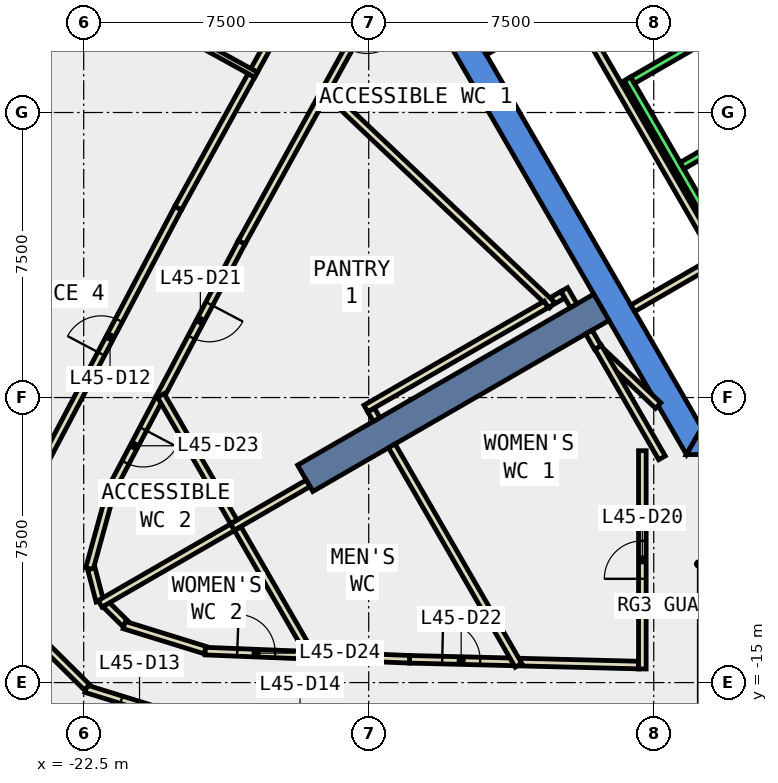
"""IFC4 building model, lengths in metres.
Left out: names, types, materials, properties, quantities, classifications, styles, units other than length and angle.
Written with IfcOpenShell. Run it as: python <this file> out.ifc"""

import sys

from ifc_helpers import new_model, si_unit, direction, frame, frame_2d, origin, place, context, subcontext, project, spatial, polyline, rectangle, outline, extrude, element, fill, save


model = new_model("IFC4")
c1 = context("Model", 3, precision=1e-05, world=origin(), true_north=direction((0.0, 1.0)))
c2 = subcontext(c1, "Body", "Model", "MODEL_VIEW")
j1 = project(units=[si_unit("LENGTHUNIT", "METRE"), si_unit("PLANEANGLEUNIT", "RADIAN")], contexts=[c1])
p1 = place(None, origin())
s1 = spatial("IfcSite", under=j1, at=p1, CompositionType="ELEMENT")
p2 = place(p1, origin())
s2 = spatial("IfcBuilding", under=s1, at=p2, CompositionType="ELEMENT")
p3 = place(p2, frame((0.0, 0.0, 202.4)))
s3 = spatial("IfcBuildingStorey", under=s2, at=p3, CompositionType="ELEMENT", Elevation=202.4)
p4 = place(p3, frame((0.0, 0.0, -0.4)))
e1 = element("IfcWall", 1, at=p4, inside=s3, PredefinedType="SHEAR", context=c2, shape_type="SweptSolid", body=[
    extrude(outline(polyline([(-13.279, 2.5), (-6.64, -9.0), (-6.235, -8.3), (-12.471, 2.5), (-13.279, 2.5)])), origin(), (0.0, 0.0, 1.0), 4.2),
])
p5 = place(p3, frame((0.0, 0.0, -0.4)))
e2 = element("IfcWall", 2, at=p5, inside=s3, PredefinedType="SHEAR", context=c2, shape_type="SweptSolid", body=[
    extrude(outline(polyline([(3.75, -9.0), (3.75, -8.3), (-6.235, -8.3), (-6.64, -9.0), (3.75, -9.0)])), origin(), (0.0, 0.0, 1.0), 4.2),
])
p6 = place(p3, frame((-8.877, -5.125, -0.4), z_axis=(0.0, 0.0, 1.0), x_axis=(-0.866017533419, -0.500013631625, 0.0)))
e3 = element("IfcWall", 3, at=p6, inside=s3, PredefinedType="SHEAR", context=c2, shape_type="SweptSolid", body=[
    extrude(rectangle(XDim=9.0, YDim=0.8, at=frame_2d((4.5, 0.0))), origin(), (0.0, 0.0, 1.0), 4.2),
])
p7 = place(p3, frame((-21.51, 7.086, 0.0), z_axis=(0.0, 0.0, 1.0), x_axis=(-0.483590905878, -0.875294142419, 0.0)))
e4 = element("IfcWall", 4, at=p7, inside=s3, PredefinedType="STANDARD", context=c2, shape_type="SweptSolid", body=[
    extrude(rectangle(XDim=7.238, YDim=0.3, at=frame_2d((3.619, 0.0))), origin(), (0.0, 0.0, 1.0), 3.8),
])
p8 = place(p7, frame((0.609, 0.0, 0.9)))
e5 = element("IfcOpeningElement", 5, at=p8, cuts=e4, PredefinedType="OPENING", context=c2, shape_type="SweptSolid", body=[
    extrude(rectangle(XDim=2.4, YDim=2.6, at=frame_2d((1.2, 1.3))), frame((0.0, 0.16, 0.0), z_axis=(0.0, -1.0, 0.0), x_axis=(1.0, 0.0, 0.0)), (0.0, 0.0, 1.0), 0.32),
])
p9 = place(p7, frame((4.228, 0.0, 0.9)))
e6 = element("IfcOpeningElement", 6, at=p9, cuts=e4, PredefinedType="OPENING", context=c2, shape_type="SweptSolid", body=[
    extrude(rectangle(XDim=2.4, YDim=2.6, at=frame_2d((1.2, 1.3))), frame((0.0, 0.16, 0.0), z_axis=(0.0, -1.0, 0.0), x_axis=(1.0, 0.0, 0.0)), (0.0, 0.0, 1.0), 0.32),
])
p10 = place(p3, frame((-14.487, 3.564, 0.0), z_axis=(0.0, 0.0, 1.0), x_axis=(-0.483555199903, -0.875313868648, 0.0)))
e7 = element("IfcWall", 7, at=p10, inside=s3, PredefinedType="PARTITIONING", context=c2, shape_type="SweptSolid", body=[
    extrude(rectangle(XDim=3.309, YDim=0.2, at=frame_2d((1.654, 0.0))), origin(), (0.0, 0.0, 1.0), 3.8),
])
p11 = place(p10, frame((1.154, 0.0, 0.0)))
e8 = element("IfcOpeningElement", 8, at=p11, cuts=e7, PredefinedType="OPENING", context=c2, shape_type="SweptSolid", body=[
    extrude(rectangle(XDim=1.0, YDim=2.1, at=frame_2d((0.5, 1.05))), frame((0.0, 0.11, 0.0), z_axis=(0.0, -1.0, 0.0), x_axis=(1.0, 0.0, 0.0)), (0.0, 0.0, 1.0), 0.22),
])
p12 = place(p3, frame((-11.009, -14.461, 0.0), z_axis=(0.0, 0.0, 1.0), x_axis=(0.999684451251, -0.025119672116, 0.0)))
e9 = element("IfcWall", 9, at=p12, inside=s3, PredefinedType="PARTITIONING", context=c2, shape_type="SweptSolid", body=[
    extrude(rectangle(XDim=3.11, YDim=0.2, at=frame_2d((1.555, 0.0))), origin(), (0.0, 0.0, 1.0), 3.8),
])
p13 = place(p3, frame((-16.184, 0.493, 0.0), z_axis=(0.0, 0.0, 1.0), x_axis=(-0.48354397003, -0.875320072344, 0.0)))
e10 = element("IfcWall", 10, at=p13, inside=s3, PredefinedType="PARTITIONING", context=c2, shape_type="SweptSolid", body=[
    extrude(rectangle(XDim=4.467, YDim=0.2, at=frame_2d((2.233, 0.0))), origin(), (0.0, 0.0, 1.0), 3.8),
])
p14 = place(p3, frame((-18.344, -3.417, 0.0), z_axis=(0.0, 0.0, 1.0), x_axis=(-0.466889669343, -0.884315575267, 0.0)))
e11 = element("IfcWall", 11, at=p14, inside=s3, PredefinedType="PARTITIONING", context=c2, shape_type="SweptSolid", body=[
    extrude(rectangle(XDim=4.654, YDim=0.2, at=frame_2d((2.327, 0.0))), origin(), (0.0, 0.0, 1.0), 3.8),
])
p15 = place(p14, frame((1.827, 0.0, 0.0)))
e12 = element("IfcOpeningElement", 12, at=p15, cuts=e11, PredefinedType="OPENING", context=c2, shape_type="SweptSolid", body=[
    extrude(rectangle(XDim=1.0, YDim=2.1, at=frame_2d((0.5, 1.05))), frame((0.0, 0.11, 0.0), z_axis=(0.0, -1.0, 0.0), x_axis=(1.0, 0.0, 0.0)), (0.0, 0.0, 1.0), 0.22),
])
p16 = place(p3, frame((-16.422, -14.287, 0.0), z_axis=(0.0, 0.0, 1.0), x_axis=(0.999201426829, -0.039956333943, 0.0)))
e13 = element("IfcWall", 13, at=p16, inside=s3, PredefinedType="PARTITIONING", context=c2, shape_type="SweptSolid", body=[
    extrude(rectangle(XDim=2.499, YDim=0.2, at=frame_2d((1.25, 0.0))), origin(), (0.0, 0.0, 1.0), 3.8),
])
p17 = place(p3, frame((-13.925, -14.387, 0.0), z_axis=(0.0, 0.0, 1.0), x_axis=(0.999685678874, -0.025070768935, 0.0)))
e14 = element("IfcWall", 14, at=p17, inside=s3, PredefinedType="PARTITIONING", context=c2, shape_type="SweptSolid", body=[
    extrude(rectangle(XDim=2.717, YDim=0.2, at=frame_2d((1.358, 0.0))), origin(), (0.0, 0.0, 1.0), 3.8),
])
p18 = place(p17, frame((0.858, 0.0, 0.0)))
e15 = element("IfcOpeningElement", 15, at=p18, cuts=e14, PredefinedType="OPENING", context=c2, shape_type="SweptSolid", body=[
    extrude(rectangle(XDim=1.0, YDim=2.1, at=frame_2d((0.5, 1.05))), frame((0.0, 0.11, 0.0), z_axis=(0.0, -1.0, 0.0), x_axis=(1.0, 0.0, 0.0)), (0.0, 0.0, 1.0), 0.22),
])
p19 = place(p3, frame((-20.517, -7.533, 0.0), z_axis=(0.0, 0.0, 1.0), x_axis=(-0.466570716246, -0.88448389852, 0.0)))
e16 = element("IfcWall", 16, at=p19, inside=s3, PredefinedType="PARTITIONING", context=c2, shape_type="SweptSolid", body=[
    extrude(rectangle(XDim=2.795, YDim=0.2, at=frame_2d((1.397, 0.0))), origin(), (0.0, 0.0, 1.0), 3.8),
])
p20 = place(p19, frame((0.897, 0.0, 0.0)))
e17 = element("IfcOpeningElement", 17, at=p20, cuts=e16, PredefinedType="OPENING", context=c2, shape_type="SweptSolid", body=[
    extrude(rectangle(XDim=1.0, YDim=2.1, at=frame_2d((0.5, 1.05))), frame((0.0, 0.11, 0.0), z_axis=(0.0, -1.0, 0.0), x_axis=(1.0, 0.0, 0.0)), (0.0, 0.0, 1.0), 0.22),
])
p21 = place(p3, frame((-21.801, -10.013, 0.0), z_axis=(0.0, 0.0, 1.0), x_axis=(-0.265584627827, -0.964087550725, 0.0)))
e18 = element("IfcWall", 18, at=p21, inside=s3, PredefinedType="PARTITIONING", context=c2, shape_type="SweptSolid", body=[
    extrude(rectangle(XDim=2.067, YDim=0.2, at=frame_2d((1.034, 0.0))), origin(), (0.0, 0.0, 1.0), 3.8),
])
p22 = place(p3, frame((-22.298, -12.006, 0.0), z_axis=(0.0, 0.0, 1.0), x_axis=(0.252647929446, -0.967558279251, 0.0)))
e19 = element("IfcWall", 19, at=p22, inside=s3, PredefinedType="PARTITIONING", context=c2, shape_type="SweptSolid", body=[
    extrude(rectangle(XDim=0.879, YDim=0.2, at=frame_2d((0.44, 0.0))), origin(), (0.0, 0.0, 1.0), 3.8),
])
p23 = place(p3, frame((-21.912, -12.948, 0.0), z_axis=(0.0, 0.0, 1.0), x_axis=(0.712089244685, -0.702088959893, 0.0)))
e20 = element("IfcWall", 20, at=p23, inside=s3, PredefinedType="PARTITIONING", context=c2, shape_type="SweptSolid", body=[
    extrude(rectangle(XDim=0.708, YDim=0.2, at=frame_2d((0.354, 0.0))), origin(), (0.0, 0.0, 1.0), 3.8),
])
p24 = place(p3, frame((-21.433, -13.486, 0.0), z_axis=(0.0, 0.0, 1.0), x_axis=(0.955241047187, -0.295828568211, 0.0)))
e21 = element("IfcWall", 21, at=p24, inside=s3, PredefinedType="PARTITIONING", context=c2, shape_type="SweptSolid", body=[
    extrude(rectangle(XDim=2.234, YDim=0.2, at=frame_2d((1.117, 0.0))), origin(), (0.0, 0.0, 1.0), 3.8),
])
p25 = place(p3, frame((-19.303, -14.172, 0.0), z_axis=(0.0, 0.0, 1.0), x_axis=(0.999205458466, -0.03985538574, 0.0)))
e22 = element("IfcWall", 22, at=p25, inside=s3, PredefinedType="PARTITIONING", context=c2, shape_type="SweptSolid", body=[
    extrude(rectangle(XDim=2.683, YDim=0.2, at=frame_2d((1.342, 0.0))), origin(), (0.0, 0.0, 1.0), 3.8),
])
p26 = place(p25, frame((0.842, 0.0, 0.0)))
e23 = element("IfcOpeningElement", 23, at=p26, cuts=e22, PredefinedType="OPENING", context=c2, shape_type="SweptSolid", body=[
    extrude(rectangle(XDim=1.0, YDim=2.1, at=frame_2d((0.5, 1.05))), frame((0.0, 0.11, 0.0), z_axis=(0.0, -1.0, 0.0), x_axis=(1.0, 0.0, 0.0)), (0.0, 0.0, 1.0), 0.22),
])
p27 = place(p3, frame((-18.015, 1.107, 0.0), z_axis=(0.0, 0.0, 1.0), x_axis=(0.483551557311, 0.875315880938, 0.0)))
e24 = element("IfcWall", 24, at=p27, inside=s3, PredefinedType="PARTITIONING", context=c2, shape_type="SweptSolid", body=[
    extrude(rectangle(XDim=3.987, YDim=0.2, at=frame_2d((1.994, 0.0))), origin(), (0.0, 0.0, 1.0), 3.8),
])
p28 = place(p3, frame((-23.598, -9.301, 0.0), z_axis=(0.0, 0.0, 1.0), x_axis=(0.466852608943, 0.884335140952, 0.0)))
e25 = element("IfcWall", 25, at=p28, inside=s3, PredefinedType="PARTITIONING", context=c2, shape_type="SweptSolid", body=[
    extrude(rectangle(XDim=7.675, YDim=0.2, at=frame_2d((3.837, 0.0))), origin(), (0.0, 0.0, 1.0), 3.8),
])
p29 = place(p28, frame((3.337, 0.0, 0.0)))
e26 = element("IfcOpeningElement", 26, at=p29, cuts=e25, PredefinedType="OPENING", context=c2, shape_type="SweptSolid", body=[
    extrude(rectangle(XDim=1.0, YDim=2.1, at=frame_2d((0.5, 1.05))), frame((0.0, 0.11, 0.0), z_axis=(0.0, -1.0, 0.0), x_axis=(1.0, 0.0, 0.0)), (0.0, 0.0, 1.0), 0.22),
])
p30 = place(p3, frame((-20.015, -2.514, 0.0), z_axis=(0.0, 0.0, 1.0), x_axis=(0.483363864601, 0.875419541933, 0.0)))
e27 = element("IfcWall", 27, at=p30, inside=s3, PredefinedType="PARTITIONING", context=c2, shape_type="SweptSolid", body=[
    extrude(rectangle(XDim=3.987, YDim=0.2, at=frame_2d((1.993, 0.0))), origin(), (0.0, 0.0, 1.0), 3.8),
])
p31 = place(p3, frame((-19.623, -16.035, 0.0), z_axis=(0.0, 0.0, 1.0), x_axis=(-0.955234616163, 0.295849333419, 0.0)))
e28 = element("IfcWall", 28, at=p31, inside=s3, PredefinedType="PARTITIONING", context=c2, shape_type="SweptSolid", body=[
    extrude(rectangle(XDim=2.947, YDim=0.2, at=frame_2d((1.473, 0.0))), origin(), (0.0, 0.0, 1.0), 3.8),
])
p32 = place(p31, frame((0.974, 0.0, 0.0)))
e29 = element("IfcOpeningElement", 29, at=p32, cuts=e28, PredefinedType="OPENING", context=c2, shape_type="SweptSolid", body=[
    extrude(rectangle(XDim=1.0, YDim=2.1, at=frame_2d((0.5, 1.05))), frame((0.0, 0.11, 0.0), z_axis=(0.0, -1.0, 0.0), x_axis=(1.0, 0.0, 0.0)), (0.0, 0.0, 1.0), 0.22),
])
p33 = place(p3, frame((-22.414, -15.123, 0.0), z_axis=(0.0, 0.0, 1.0), x_axis=(-0.710949827962, 0.703242733429, 0.0)))
e30 = element("IfcWall", 30, at=p33, inside=s3, PredefinedType="PARTITIONING", context=c2, shape_type="SweptSolid", body=[
    extrude(rectangle(XDim=2.059, YDim=0.2, at=frame_2d((1.03, 0.0))), origin(), (0.0, 0.0, 1.0), 3.8),
])
p34 = place(p3, frame((-5.888, -3.902, 0.0), z_axis=(0.0, 0.0, 1.0), x_axis=(-0.866022959057, -0.500004234368, 0.0)))
e31 = element("IfcWall", 31, at=p34, inside=s3, PredefinedType="PARTITIONING", context=c2, shape_type="SweptSolid", body=[
    extrude(rectangle(XDim=2.5, YDim=0.2, at=frame_2d((1.25, 0.0))), origin(), (0.0, 0.0, 1.0), 3.8),
])
p35 = place(p3, frame((-11.953, 1.603, 0.0), z_axis=(0.0, 0.0, 1.0), x_axis=(0.865998541277, 0.500046524342, 0.0)))
e32 = element("IfcWall", 32, at=p35, inside=s3, PredefinedType="PARTITIONING", context=c2, shape_type="SweptSolid", body=[
    extrude(rectangle(XDim=2.5, YDim=0.2, at=frame_2d((1.25, 0.0))), origin(), (0.0, 0.0, 1.0), 3.8),
])
p36 = place(p35, frame((1.5, 0.0, 0.0)))
e33 = element("IfcOpeningElement", 33, at=p36, cuts=e32, PredefinedType="OPENING", context=c2, shape_type="SweptSolid", body=[
    extrude(rectangle(XDim=0.9, YDim=2.1, at=frame_2d((0.45, 1.05))), frame((0.0, 0.11, 0.0), z_axis=(0.0, -1.0, 0.0), x_axis=(1.0, 0.0, 0.0)), (0.0, 0.0, 1.0), 0.22),
])
p37 = place(p3, frame((-9.751, 2.99, 0.0), z_axis=(0.0, 0.0, 1.0), x_axis=(0.500012163284, -0.866018381195, 0.0)))
e34 = element("IfcWall", 34, at=p37, inside=s3, PredefinedType="PARTITIONING", context=c2, shape_type="SweptSolid", body=[
    extrude(rectangle(XDim=8.0, YDim=0.2, at=frame_2d((4.0, 0.0))), origin(), (0.0, 0.0, 1.0), 3.8),
])
p38 = place(p3, frame((-8.84, -6.332, 0.0), z_axis=(0.0, 0.0, 1.0), x_axis=(0.726080635734, -0.687609562479, 0.0)))
e35 = element("IfcWall", 35, at=p38, inside=s3, PredefinedType="PARTITIONING", context=c2, shape_type="SweptSolid", body=[
    extrude(rectangle(XDim=2.005, YDim=0.2, at=frame_2d((1.003, 0.0))), origin(), (0.0, 0.0, 1.0), 3.8),
])
p39 = place(p3, frame((-7.8, -14.641, 0.0), z_axis=(0.0, 0.0, 1.0), x_axis=(0.0, 1.0, 0.0)))
e36 = element("IfcWall", 36, at=p39, inside=s3, PredefinedType="PARTITIONING", context=c2, shape_type="SweptSolid", body=[
    extrude(rectangle(XDim=5.742, YDim=0.2, at=frame_2d((2.871, 0.0))), origin(), (0.0, 0.0, 1.0), 3.8),
])
p40 = place(p39, frame((2.371, 0.0, 0.0)))
e37 = element("IfcOpeningElement", 37, at=p40, cuts=e36, PredefinedType="OPENING", context=c2, shape_type="SweptSolid", body=[
    extrude(rectangle(XDim=1.0, YDim=2.1, at=frame_2d((0.5, 1.05))), frame((0.0, 0.11, 0.0), z_axis=(0.0, -1.0, 0.0), x_axis=(1.0, 0.0, 0.0)), (0.0, 0.0, 1.0), 0.22),
])
p41 = place(p3, frame((-7.283, -9.086, 0.0), z_axis=(0.0, 0.0, 1.0), x_axis=(-0.499883958536, 0.86609238999, 0.0)))
e38 = element("IfcWall", 38, at=p41, inside=s3, PredefinedType="PARTITIONING", context=c2, shape_type="SweptSolid", body=[
    extrude(rectangle(XDim=3.359, YDim=0.2, at=frame_2d((1.679, 0.0))), origin(), (0.0, 0.0, 1.0), 3.8),
])
p42 = place(p3, frame((-8.973, -6.183, 0.0), z_axis=(0.0, 0.0, 1.0), x_axis=(-0.499557093027, 0.86628096528, 0.0)))
e39 = element("IfcWall", 39, at=p42, inside=s3, PredefinedType="PARTITIONING", context=c2, shape_type="SweptSolid", body=[
    extrude(rectangle(XDim=0.469, YDim=0.2, at=frame_2d((0.234, 0.0))), origin(), (0.0, 0.0, 1.0), 3.8),
])
p43 = place(p3, frame((-9.89, -4.795, 0.0), z_axis=(0.0, 0.0, 1.0), x_axis=(-0.866447259568, -0.499268611457, 0.0)))
e40 = element("IfcWall", 40, at=p43, inside=s3, PredefinedType="PARTITIONING", context=c2, shape_type="SweptSolid", body=[
    extrude(rectangle(XDim=0.311, YDim=0.2, at=frame_2d((0.155, 0.0))), origin(), (0.0, 0.0, 1.0), 3.8),
])
p44 = place(p3, frame((-10.173, -5.069, 0.0), z_axis=(0.0, 0.0, 1.0), x_axis=(-0.725908697087, 0.687791075468, 0.0)))
e41 = element("IfcWall", 41, at=p44, inside=s3, PredefinedType="PARTITIONING", context=c2, shape_type="SweptSolid", body=[
    extrude(rectangle(XDim=8.313, YDim=0.2, at=frame_2d((4.157, 0.0))), origin(), (0.0, 0.0, 1.0), 3.8),
])
p45 = place(p3, frame((-14.792, -8.078, 0.0), z_axis=(0.0, 0.0, 1.0), x_axis=(-0.50241736454, 0.864625231999, 0.0)))
e42 = element("IfcWall", 42, at=p45, inside=s3, PredefinedType="PARTITIONING", context=c2, shape_type="SweptSolid", body=[
    extrude(rectangle(XDim=0.292, YDim=0.2, at=frame_2d((0.146, 0.0))), origin(), (0.0, 0.0, 1.0), 3.8),
])
p46 = place(p3, frame((-15.076, -7.788, 0.0), z_axis=(0.0, 0.0, 1.0), x_axis=(0.866092814325, 0.499883223337, 0.0)))
e43 = element("IfcWall", 43, at=p46, inside=s3, PredefinedType="PARTITIONING", context=c2, shape_type="SweptSolid", body=[
    extrude(rectangle(XDim=5.477, YDim=0.2, at=frame_2d((2.739, 0.0))), origin(), (0.0, 0.0, 1.0), 3.8),
])
p47 = place(p3, frame((-11.059, -14.545, 0.0), z_axis=(0.0, 0.0, 1.0), x_axis=(-0.499935899035, 0.866062409331, 0.0)))
e44 = element("IfcWall", 44, at=p47, inside=s3, PredefinedType="PARTITIONING", context=c2, shape_type="SweptSolid", body=[
    extrude(rectangle(XDim=6.667, YDim=0.2, at=frame_2d((3.333, 0.0))), origin(), (0.0, 0.0, 1.0), 3.8),
])
p48 = place(p3, frame((-16.595, -9.757, 0.0), z_axis=(0.0, 0.0, 1.0), x_axis=(-0.866053019151, -0.499952165731, 0.0)))
e45 = element("IfcWall", 45, at=p48, inside=s3, PredefinedType="PARTITIONING", context=c2, shape_type="SweptSolid", body=[
    extrude(rectangle(XDim=2.3, YDim=0.2, at=frame_2d((1.15, 0.0))), origin(), (0.0, 0.0, 1.0), 3.8),
])
p49 = place(p3, frame((-18.55, -10.77, 0.0), z_axis=(0.0, 0.0, 1.0), x_axis=(-0.500050869834, 0.86599603208, 0.0)))
e46 = element("IfcWall", 46, at=p49, inside=s3, PredefinedType="PARTITIONING", context=c2, shape_type="SweptSolid", body=[
    extrude(rectangle(XDim=3.839, YDim=0.2, at=frame_2d((1.92, 0.0))), origin(), (0.0, 0.0, 1.0), 3.8),
])
p50 = place(p3, frame((-16.472, -14.37, 0.0), z_axis=(0.0, 0.0, 1.0), x_axis=(-0.500009715097, 0.866019794698, 0.0)))
e47 = element("IfcWall", 47, at=p50, inside=s3, PredefinedType="PARTITIONING", context=c2, shape_type="SweptSolid", body=[
    extrude(rectangle(XDim=3.948, YDim=0.2, at=frame_2d((1.974, 0.0))), origin(), (0.0, 0.0, 1.0), 3.8),
])
p51 = place(p3, frame((-18.583, -10.914, 0.0), z_axis=(0.0, 0.0, 1.0), x_axis=(-0.8659987338, -0.500046190923, 0.0)))
e48 = element("IfcWall", 48, at=p51, inside=s3, PredefinedType="PARTITIONING", context=c2, shape_type="SweptSolid", body=[
    extrude(rectangle(XDim=4.025, YDim=0.2, at=frame_2d((2.013, 0.0))), origin(), (0.0, 0.0, 1.0), 3.8),
])
p52 = place(p3, frame((-17.964, 0.993, 0.0), z_axis=(0.0, 0.0, 1.0), x_axis=(-0.875289017238, 0.483600182282, 0.0)))
e49 = element("IfcWall", 49, at=p52, inside=s3, PredefinedType="PARTITIONING", context=c2, shape_type="SweptSolid", body=[
    extrude(rectangle(XDim=5.9, YDim=0.15, at=frame_2d((2.95, 0.0))), origin(), (0.0, 0.0, 1.0), 3.8),
])
p53 = place(p3, frame((-9.607, -5.084, 0.0), z_axis=(0.0, 0.0, 1.0), x_axis=(-0.500194922027, 0.865912836248, 0.0)))
e50 = element("IfcWall", 50, at=p53, inside=s3, PredefinedType="PARTITIONING", context=c2, shape_type="SweptSolid", body=[
    extrude(rectangle(XDim=0.492, YDim=0.2, at=frame_2d((0.246, 0.0))), origin(), (0.0, 0.0, 1.0), 3.8),
])
p54 = place(p3, frame((-8.192, 0.888, 0.0), z_axis=(0.0, 0.0, 1.0), x_axis=(0.500034260056, -0.866005622828, 0.0)))
e51 = element("IfcWall", 51, at=p54, inside=s3, PredefinedType="STANDARD", context=c2, shape_type="SweptSolid", body=[
    extrude(rectangle(XDim=5.399, YDim=0.2, at=frame_2d((2.7, 0.0))), origin(), (0.0, 0.0, 1.0), 3.8),
])
for number, where, z_axis, x_axis in (
    (52, (-5.977, 2.052, 0.0), (0.0, 0.0, 1.0), (-0.866, -0.5, 0.0)),
    (53, (-4.677, -0.2, 0.0), (0.0, 0.0, 1.0), (-0.866, -0.5, 0.0)),
):
    element("IfcWall", number, at=place(p3, frame(where, z_axis=z_axis, x_axis=x_axis)), inside=s3, PredefinedType="STANDARD", context=c2, shape_type="SweptSolid", body=[
        extrude(rectangle(XDim=2.399, YDim=0.2, at=frame_2d((1.2, 0.0))), origin(), (0.0, 0.0, 1.0), 3.8),
    ])
p55 = place(p29, origin())
e54 = element("IfcDoor", 54, at=p55, inside=s3, OperationType="SINGLE_SWING_LEFT", PredefinedType="DOOR", context=c2, shape_type="SweptSolid", body=[
    extrude(rectangle(XDim=1.0, YDim=2.1, at=frame_2d((0.5, 1.05))), frame((0.0, 0.025, 0.0), z_axis=(0.0, -1.0, 0.0), x_axis=(1.0, 0.0, 0.0)), (0.0, 0.0, 1.0), 0.05),
])
fill(e26, e54)
p56 = place(p32, origin())
e55 = element("IfcDoor", 55, at=p56, inside=s3, OperationType="SINGLE_SWING_LEFT", PredefinedType="DOOR", context=c2, shape_type="SweptSolid", body=[
    extrude(rectangle(XDim=1.0, YDim=2.1, at=frame_2d((0.5, 1.05))), frame((0.0, 0.025, 0.0), z_axis=(0.0, -1.0, 0.0), x_axis=(1.0, 0.0, 0.0)), (0.0, 0.0, 1.0), 0.05),
])
fill(e29, e55)
p57 = place(p40, origin())
e56 = element("IfcDoor", 56, at=p57, inside=s3, OperationType="SINGLE_SWING_LEFT", PredefinedType="DOOR", context=c2, shape_type="SweptSolid", body=[
    extrude(rectangle(XDim=1.0, YDim=2.1, at=frame_2d((0.5, 1.05))), frame((0.0, 0.025, 0.0), z_axis=(0.0, -1.0, 0.0), x_axis=(1.0, 0.0, 0.0)), (0.0, 0.0, 1.0), 0.05),
])
fill(e37, e56)
p58 = place(p15, origin())
e57 = element("IfcDoor", 57, at=p58, inside=s3, OperationType="SINGLE_SWING_LEFT", PredefinedType="DOOR", context=c2, shape_type="SweptSolid", body=[
    extrude(rectangle(XDim=1.0, YDim=2.1, at=frame_2d((0.5, 1.05))), frame((0.0, 0.025, 0.0), z_axis=(0.0, -1.0, 0.0), x_axis=(1.0, 0.0, 0.0)), (0.0, 0.0, 1.0), 0.05),
])
fill(e12, e57)
p59 = place(p18, origin())
e58 = element("IfcDoor", 58, at=p59, inside=s3, OperationType="SINGLE_SWING_LEFT", PredefinedType="DOOR", context=c2, shape_type="SweptSolid", body=[
    extrude(rectangle(XDim=1.0, YDim=2.1, at=frame_2d((0.5, 1.05))), frame((0.0, 0.025, 0.0), z_axis=(0.0, -1.0, 0.0), x_axis=(1.0, 0.0, 0.0)), (0.0, 0.0, 1.0), 0.05),
])
fill(e15, e58)
p60 = place(p20, origin())
e59 = element("IfcDoor", 59, at=p60, inside=s3, OperationType="SINGLE_SWING_LEFT", PredefinedType="DOOR", context=c2, shape_type="SweptSolid", body=[
    extrude(rectangle(XDim=1.0, YDim=2.1, at=frame_2d((0.5, 1.05))), frame((0.0, 0.025, 0.0), z_axis=(0.0, -1.0, 0.0), x_axis=(1.0, 0.0, 0.0)), (0.0, 0.0, 1.0), 0.05),
])
fill(e17, e59)
p61 = place(p26, origin())
e60 = element("IfcDoor", 60, at=p61, inside=s3, OperationType="SINGLE_SWING_LEFT", PredefinedType="DOOR", context=c2, shape_type="SweptSolid", body=[
    extrude(rectangle(XDim=1.0, YDim=2.1, at=frame_2d((0.5, 1.05))), frame((0.0, 0.025, 0.0), z_axis=(0.0, -1.0, 0.0), x_axis=(1.0, 0.0, 0.0)), (0.0, 0.0, 1.0), 0.05),
])
fill(e23, e60)
save(model, sys.argv[1])
